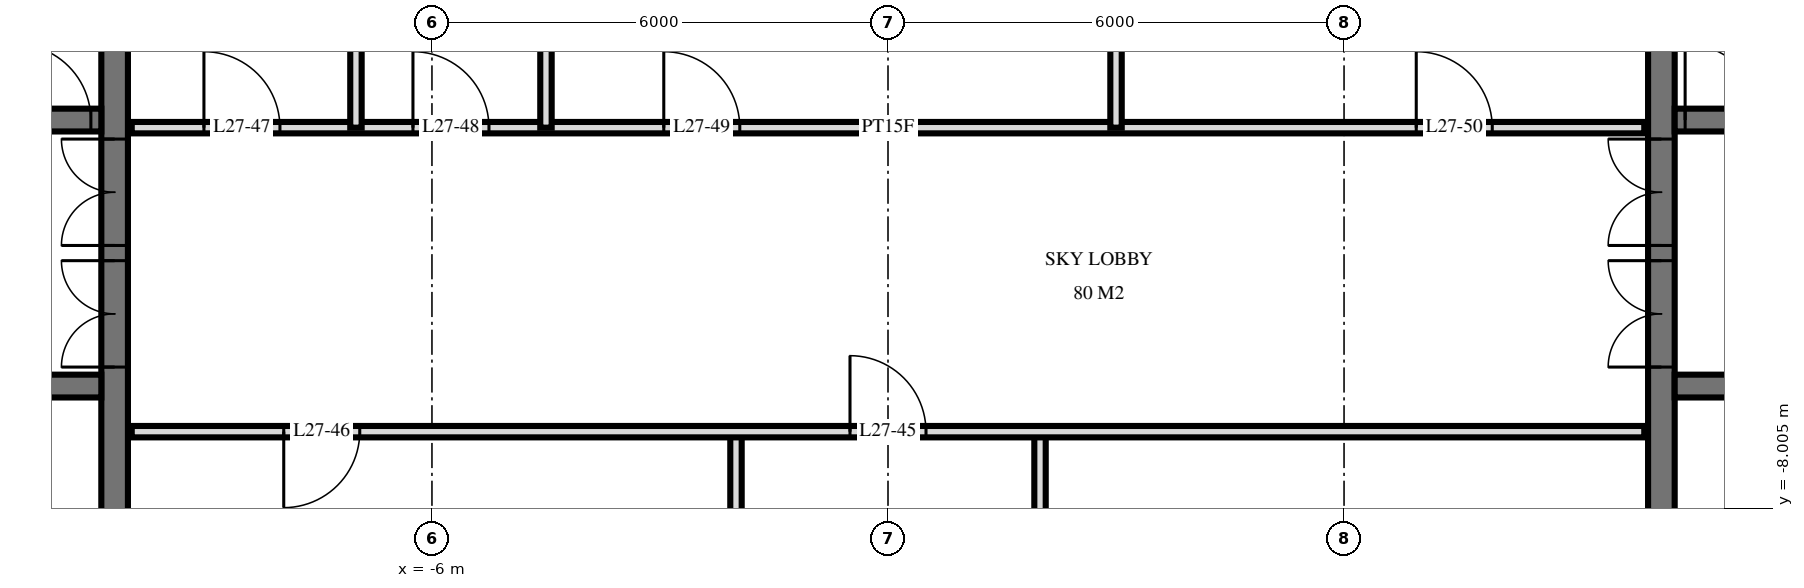
"""IFC4 building model, lengths in metres.
Left out: names, types, materials, properties, quantities, classifications, styles, units other than length and angle.
Written with IfcOpenShell. Run it as: python <this file> out.ifc"""

import sys

from ifc_helpers import new_model, si_unit, direction, frame, frame_2d, origin, place, context, subcontext, project, spatial, rectangle, extrude, element, fill, save


model = new_model("IFC4")
c1 = context("Model", 3, precision=1e-05, world=origin(), true_north=direction((0.0, 1.0)))
c2 = subcontext(c1, "Body", "Model", "MODEL_VIEW")
j1 = project(units=[si_unit("LENGTHUNIT", "METRE"), si_unit("PLANEANGLEUNIT", "RADIAN")], contexts=[c1])
p1 = place(None, origin())
s1 = spatial("IfcSite", under=j1, at=p1, CompositionType="ELEMENT")
p2 = place(p1, origin())
s2 = spatial("IfcBuilding", under=s1, at=p2, CompositionType="ELEMENT")
p3 = place(p2, frame((0.0, 0.0, 106.8)))
s3 = spatial("IfcBuildingStorey", under=s2, at=p3, CompositionType="ELEMENT", Elevation=106.8)
p4 = place(p3, frame((-10.175, -14.55, 0.0), z_axis=(0.0, 0.0, 1.0), x_axis=(0.0, 1.0, 0.0)))
e1 = element("IfcWall", 1, at=p4, inside=s3, PredefinedType="SHEAR", context=c2, shape_type="SweptSolid", body=[
    extrude(rectangle(XDim=14.1, YDim=0.35, at=frame_2d((7.05, 0.0))), origin(), (0.0, 0.0, 1.0), 6.0),
])
p5 = place(p4, frame((8.4, 0.0, 0.0)))
e2 = element("IfcOpeningElement", 2, at=p5, cuts=e1, PredefinedType="OPENING", context=c2, shape_type="SweptSolid", body=[
    extrude(rectangle(XDim=1.4, YDim=2.4, at=frame_2d((0.7, 1.2))), frame((0.0, 0.185, 0.0), z_axis=(0.0, -1.0, 0.0), x_axis=(1.0, 0.0, 0.0)), (0.0, 0.0, 1.0), 0.37),
])
p6 = place(p4, frame((10.0, 0.0, 0.0)))
e3 = element("IfcOpeningElement", 3, at=p6, cuts=e1, PredefinedType="OPENING", context=c2, shape_type="SweptSolid", body=[
    extrude(rectangle(XDim=1.4, YDim=2.4, at=frame_2d((0.7, 1.2))), frame((0.0, 0.185, 0.0), z_axis=(0.0, -1.0, 0.0), x_axis=(1.0, 0.0, 0.0)), (0.0, 0.0, 1.0), 0.37),
])
p7 = place(p4, frame((4.0, 0.0, 0.0)))
e4 = element("IfcOpeningElement", 4, at=p7, cuts=e1, PredefinedType="OPENING", context=c2, shape_type="SweptSolid", body=[
    extrude(rectangle(XDim=1.2, YDim=2.1, at=frame_2d((0.6, 1.05))), frame((0.0, 0.185, 0.0), z_axis=(0.0, -1.0, 0.0), x_axis=(1.0, 0.0, 0.0)), (0.0, 0.0, 1.0), 0.37),
])
p8 = place(p3, frame((-24.05, -2.9, 0.0), z_axis=(0.0, 0.0, 1.0), x_axis=(1.0, 0.0, 0.0)))
e5 = element("IfcWall", 5, at=p8, inside=s3, PredefinedType="SHEAR", context=c2, shape_type="SweptSolid", body=[
    extrude(rectangle(XDim=13.7, YDim=0.3, at=frame_2d((6.85, 0.0))), origin(), (0.0, 0.0, 1.0), 6.0),
])
p9 = place(p8, frame((2.95, 0.0, 0.0)))
e6 = element("IfcOpeningElement", 6, at=p9, cuts=e5, PredefinedType="OPENING", context=c2, shape_type="SweptSolid", body=[
    extrude(rectangle(XDim=1.1, YDim=2.1, at=frame_2d((0.55, 1.05))), frame((0.0, 0.16, 0.0), z_axis=(0.0, -1.0, 0.0), x_axis=(1.0, 0.0, 0.0)), (0.0, 0.0, 1.0), 0.32),
])
p10 = place(p8, frame((0.55, 0.0, 0.0)))
e7 = element("IfcOpeningElement", 7, at=p10, cuts=e5, PredefinedType="OPENING", context=c2, shape_type="SweptSolid", body=[
    extrude(rectangle(XDim=1.1, YDim=2.1, at=frame_2d((0.55, 1.05))), frame((0.0, 0.16, 0.0), z_axis=(0.0, -1.0, 0.0), x_axis=(1.0, 0.0, 0.0)), (0.0, 0.0, 1.0), 0.32),
])
p11 = place(p8, frame((6.613, 0.0, 0.0)))
e8 = element("IfcOpeningElement", 8, at=p11, cuts=e5, PredefinedType="OPENING", context=c2, shape_type="SweptSolid", body=[
    extrude(rectangle(XDim=0.9, YDim=2.1, at=frame_2d((0.45, 1.05))), frame((0.0, 0.16, 0.0), z_axis=(0.0, -1.0, 0.0), x_axis=(1.0, 0.0, 0.0)), (0.0, 0.0, 1.0), 0.32),
])
p12 = place(p8, frame((5.188, 0.0, 0.0)))
e9 = element("IfcOpeningElement", 9, at=p12, cuts=e5, PredefinedType="OPENING", context=c2, shape_type="SweptSolid", body=[
    extrude(rectangle(XDim=0.9, YDim=2.1, at=frame_2d((0.45, 1.05))), frame((0.0, 0.16, 0.0), z_axis=(0.0, -1.0, 0.0), x_axis=(1.0, 0.0, 0.0)), (0.0, 0.0, 1.0), 0.32),
])
p13 = place(p8, frame((12.562, 0.0, 0.0)))
e10 = element("IfcOpeningElement", 10, at=p13, cuts=e5, PredefinedType="OPENING", context=c2, shape_type="SweptSolid", body=[
    extrude(rectangle(XDim=1.0, YDim=2.1, at=frame_2d((0.5, 1.05))), frame((0.0, 0.16, 0.0), z_axis=(0.0, -1.0, 0.0), x_axis=(1.0, 0.0, 0.0)), (0.0, 0.0, 1.0), 0.32),
])
p14 = place(p8, frame((11.137, 0.0, 0.0)))
e11 = element("IfcOpeningElement", 11, at=p14, cuts=e5, PredefinedType="OPENING", context=c2, shape_type="SweptSolid", body=[
    extrude(rectangle(XDim=1.0, YDim=2.1, at=frame_2d((0.5, 1.05))), frame((0.0, 0.16, 0.0), z_axis=(0.0, -1.0, 0.0), x_axis=(1.0, 0.0, 0.0)), (0.0, 0.0, 1.0), 0.32),
])
p15 = place(p8, frame((8.85, 0.0, 0.0)))
e12 = element("IfcOpeningElement", 12, at=p15, cuts=e5, PredefinedType="OPENING", context=c2, shape_type="SweptSolid", body=[
    extrude(rectangle(XDim=1.0, YDim=2.1, at=frame_2d((0.5, 1.05))), frame((0.0, 0.16, 0.0), z_axis=(0.0, -1.0, 0.0), x_axis=(1.0, 0.0, 0.0)), (0.0, 0.0, 1.0), 0.32),
])
p16 = place(p3, frame((-24.05, -6.4, 0.0), z_axis=(0.0, 0.0, 1.0), x_axis=(1.0, 0.0, 0.0)))
e13 = element("IfcWall", 13, at=p16, inside=s3, PredefinedType="SHEAR", context=c2, shape_type="SweptSolid", body=[
    extrude(rectangle(XDim=13.7, YDim=0.3, at=frame_2d((6.85, 0.0))), origin(), (0.0, 0.0, 1.0), 6.0),
])
p17 = place(p16, frame((2.95, 0.0, 0.0)))
e14 = element("IfcOpeningElement", 14, at=p17, cuts=e13, PredefinedType="OPENING", context=c2, shape_type="SweptSolid", body=[
    extrude(rectangle(XDim=1.1, YDim=2.1, at=frame_2d((0.55, 1.05))), frame((0.0, 0.16, 0.0), z_axis=(0.0, -1.0, 0.0), x_axis=(1.0, 0.0, 0.0)), (0.0, 0.0, 1.0), 0.32),
])
p18 = place(p16, frame((0.55, 0.0, 0.0)))
e15 = element("IfcOpeningElement", 15, at=p18, cuts=e13, PredefinedType="OPENING", context=c2, shape_type="SweptSolid", body=[
    extrude(rectangle(XDim=1.1, YDim=2.1, at=frame_2d((0.55, 1.05))), frame((0.0, 0.16, 0.0), z_axis=(0.0, -1.0, 0.0), x_axis=(1.0, 0.0, 0.0)), (0.0, 0.0, 1.0), 0.32),
])
p19 = place(p16, frame((5.8, 0.0, 0.0)))
e16 = element("IfcOpeningElement", 16, at=p19, cuts=e13, PredefinedType="OPENING", context=c2, shape_type="SweptSolid", body=[
    extrude(rectangle(XDim=1.1, YDim=2.1, at=frame_2d((0.55, 1.05))), frame((0.0, 0.16, 0.0), z_axis=(0.0, -1.0, 0.0), x_axis=(1.0, 0.0, 0.0)), (0.0, 0.0, 1.0), 0.32),
])
p20 = place(p3, frame((10.175, -14.55, 0.0), z_axis=(0.0, 0.0, 1.0), x_axis=(0.0, 1.0, 0.0)))
e17 = element("IfcWall", 17, at=p20, inside=s3, PredefinedType="SHEAR", context=c2, shape_type="SweptSolid", body=[
    extrude(rectangle(XDim=14.1, YDim=0.35, at=frame_2d((7.05, 0.0))), origin(), (0.0, 0.0, 1.0), 6.0),
])
p21 = place(p20, frame((8.4, 0.0, 0.0)))
e18 = element("IfcOpeningElement", 18, at=p21, cuts=e17, PredefinedType="OPENING", context=c2, shape_type="SweptSolid", body=[
    extrude(rectangle(XDim=1.4, YDim=2.4, at=frame_2d((0.7, 1.2))), frame((0.0, 0.185, 0.0), z_axis=(0.0, -1.0, 0.0), x_axis=(1.0, 0.0, 0.0)), (0.0, 0.0, 1.0), 0.37),
])
p22 = place(p20, frame((10.0, 0.0, 0.0)))
e19 = element("IfcOpeningElement", 19, at=p22, cuts=e17, PredefinedType="OPENING", context=c2, shape_type="SweptSolid", body=[
    extrude(rectangle(XDim=1.4, YDim=2.4, at=frame_2d((0.7, 1.2))), frame((0.0, 0.185, 0.0), z_axis=(0.0, -1.0, 0.0), x_axis=(1.0, 0.0, 0.0)), (0.0, 0.0, 1.0), 0.37),
])
p23 = place(p20, frame((4.0, 0.0, 0.0)))
e20 = element("IfcOpeningElement", 20, at=p23, cuts=e17, PredefinedType="OPENING", context=c2, shape_type="SweptSolid", body=[
    extrude(rectangle(XDim=1.2, YDim=2.1, at=frame_2d((0.6, 1.05))), frame((0.0, 0.185, 0.0), z_axis=(0.0, -1.0, 0.0), x_axis=(1.0, 0.0, 0.0)), (0.0, 0.0, 1.0), 0.37),
])
p24 = place(p3, frame((10.35, -2.9, 0.0), z_axis=(0.0, 0.0, 1.0), x_axis=(1.0, 0.0, 0.0)))
e21 = element("IfcWall", 21, at=p24, inside=s3, PredefinedType="SHEAR", context=c2, shape_type="SweptSolid", body=[
    extrude(rectangle(XDim=13.7, YDim=0.3, at=frame_2d((6.85, 0.0))), origin(), (0.0, 0.0, 1.0), 6.0),
])
p25 = place(p24, frame((9.65, 0.0, 0.0)))
e22 = element("IfcOpeningElement", 22, at=p25, cuts=e21, PredefinedType="OPENING", context=c2, shape_type="SweptSolid", body=[
    extrude(rectangle(XDim=1.1, YDim=2.1, at=frame_2d((0.55, 1.05))), frame((0.0, 0.16, 0.0), z_axis=(0.0, -1.0, 0.0), x_axis=(1.0, 0.0, 0.0)), (0.0, 0.0, 1.0), 0.32),
])
p26 = place(p24, frame((12.05, 0.0, 0.0)))
e23 = element("IfcOpeningElement", 23, at=p26, cuts=e21, PredefinedType="OPENING", context=c2, shape_type="SweptSolid", body=[
    extrude(rectangle(XDim=1.1, YDim=2.1, at=frame_2d((0.55, 1.05))), frame((0.0, 0.16, 0.0), z_axis=(0.0, -1.0, 0.0), x_axis=(1.0, 0.0, 0.0)), (0.0, 0.0, 1.0), 0.32),
])
p27 = place(p24, frame((6.188, 0.0, 0.0)))
e24 = element("IfcOpeningElement", 24, at=p27, cuts=e21, PredefinedType="OPENING", context=c2, shape_type="SweptSolid", body=[
    extrude(rectangle(XDim=0.9, YDim=2.1, at=frame_2d((0.45, 1.05))), frame((0.0, 0.16, 0.0), z_axis=(0.0, -1.0, 0.0), x_axis=(1.0, 0.0, 0.0)), (0.0, 0.0, 1.0), 0.32),
])
p28 = place(p24, frame((7.613, 0.0, 0.0)))
e25 = element("IfcOpeningElement", 25, at=p28, cuts=e21, PredefinedType="OPENING", context=c2, shape_type="SweptSolid", body=[
    extrude(rectangle(XDim=0.9, YDim=2.1, at=frame_2d((0.45, 1.05))), frame((0.0, 0.16, 0.0), z_axis=(0.0, -1.0, 0.0), x_axis=(1.0, 0.0, 0.0)), (0.0, 0.0, 1.0), 0.32),
])
p29 = place(p24, frame((0.137, 0.0, 0.0)))
e26 = element("IfcOpeningElement", 26, at=p29, cuts=e21, PredefinedType="OPENING", context=c2, shape_type="SweptSolid", body=[
    extrude(rectangle(XDim=1.0, YDim=2.1, at=frame_2d((0.5, 1.05))), frame((0.0, 0.16, 0.0), z_axis=(0.0, -1.0, 0.0), x_axis=(1.0, 0.0, 0.0)), (0.0, 0.0, 1.0), 0.32),
])
p30 = place(p24, frame((1.562, 0.0, 0.0)))
e27 = element("IfcOpeningElement", 27, at=p30, cuts=e21, PredefinedType="OPENING", context=c2, shape_type="SweptSolid", body=[
    extrude(rectangle(XDim=1.0, YDim=2.1, at=frame_2d((0.5, 1.05))), frame((0.0, 0.16, 0.0), z_axis=(0.0, -1.0, 0.0), x_axis=(1.0, 0.0, 0.0)), (0.0, 0.0, 1.0), 0.32),
])
p31 = place(p24, frame((3.85, 0.0, 0.0)))
e28 = element("IfcOpeningElement", 28, at=p31, cuts=e21, PredefinedType="OPENING", context=c2, shape_type="SweptSolid", body=[
    extrude(rectangle(XDim=1.0, YDim=2.1, at=frame_2d((0.5, 1.05))), frame((0.0, 0.16, 0.0), z_axis=(0.0, -1.0, 0.0), x_axis=(1.0, 0.0, 0.0)), (0.0, 0.0, 1.0), 0.32),
])
p32 = place(p3, frame((10.35, -6.4, 0.0), z_axis=(0.0, 0.0, 1.0), x_axis=(1.0, 0.0, 0.0)))
e29 = element("IfcWall", 29, at=p32, inside=s3, PredefinedType="SHEAR", context=c2, shape_type="SweptSolid", body=[
    extrude(rectangle(XDim=13.7, YDim=0.3, at=frame_2d((6.85, 0.0))), origin(), (0.0, 0.0, 1.0), 6.0),
])
p33 = place(p32, frame((9.65, 0.0, 0.0)))
e30 = element("IfcOpeningElement", 30, at=p33, cuts=e29, PredefinedType="OPENING", context=c2, shape_type="SweptSolid", body=[
    extrude(rectangle(XDim=1.1, YDim=2.1, at=frame_2d((0.55, 1.05))), frame((0.0, 0.16, 0.0), z_axis=(0.0, -1.0, 0.0), x_axis=(1.0, 0.0, 0.0)), (0.0, 0.0, 1.0), 0.32),
])
p34 = place(p32, frame((12.05, 0.0, 0.0)))
e31 = element("IfcOpeningElement", 31, at=p34, cuts=e29, PredefinedType="OPENING", context=c2, shape_type="SweptSolid", body=[
    extrude(rectangle(XDim=1.1, YDim=2.1, at=frame_2d((0.55, 1.05))), frame((0.0, 0.16, 0.0), z_axis=(0.0, -1.0, 0.0), x_axis=(1.0, 0.0, 0.0)), (0.0, 0.0, 1.0), 0.32),
])
p35 = place(p32, frame((6.8, 0.0, 0.0)))
e32 = element("IfcOpeningElement", 32, at=p35, cuts=e29, PredefinedType="OPENING", context=c2, shape_type="SweptSolid", body=[
    extrude(rectangle(XDim=1.1, YDim=2.1, at=frame_2d((0.55, 1.05))), frame((0.0, 0.16, 0.0), z_axis=(0.0, -1.0, 0.0), x_axis=(1.0, 0.0, 0.0)), (0.0, 0.0, 1.0), 0.32),
])
p36 = place(p3, frame((3.0, -3.0, 0.0), z_axis=(0.0, 0.0, 1.0), x_axis=(0.0, 1.0, 0.0)))
e33 = element("IfcWall", 33, at=p36, inside=s3, PredefinedType="PARTITIONING", context=c2, shape_type="SweptSolid", body=[
    extrude(rectangle(XDim=3.96, YDim=0.15, at=frame_2d((1.98, 0.0))), origin(), (0.0, 0.0, 1.0), 5.7),
])
for number, where, z_axis, x_axis in (
    (34, (2.0, -11.0, 0.0), (0.0, 0.0, 1.0), (0.0, 1.0, 0.0)),
    (35, (-2.0, -11.0, 0.0), (0.0, 0.0, 1.0), (0.0, 1.0, 0.0)),
):
    element("IfcWall", number, at=place(p3, frame(where, z_axis=z_axis, x_axis=x_axis)), inside=s3, PredefinedType="PARTITIONING", context=c2, shape_type="SweptSolid", body=[
        extrude(rectangle(XDim=4.0, YDim=0.15, at=frame_2d((2.0, 0.0))), origin(), (0.0, 0.0, 1.0), 5.7),
    ])
p37 = place(p3, frame((-4.5, -3.0, 0.0), z_axis=(0.0, 0.0, 1.0), x_axis=(0.0, 1.0, 0.0)))
e36 = element("IfcWall", 36, at=p37, inside=s3, PredefinedType="PLUMBINGWALL", context=c2, shape_type="SweptSolid", body=[
    extrude(rectangle(XDim=4.02, YDim=0.15, at=frame_2d((2.01, 0.0))), origin(), (0.0, 0.0, 1.0), 5.7),
])
p38 = place(p3, frame((-7.0, -3.0, 0.0), z_axis=(0.0, 0.0, 1.0), x_axis=(0.0, 1.0, 0.0)))
e37 = element("IfcWall", 37, at=p38, inside=s3, PredefinedType="PLUMBINGWALL", context=c2, shape_type="SweptSolid", body=[
    extrude(rectangle(XDim=3.96, YDim=0.15, at=frame_2d((1.98, 0.0))), origin(), (0.0, 0.0, 1.0), 5.7),
])
p39 = place(p3, frame((-9.95, -7.0, 0.0), z_axis=(0.0, 0.0, 1.0), x_axis=(1.0, 0.0, 0.0)))
e38 = element("IfcWall", 38, at=p39, inside=s3, PredefinedType="PARTITIONING", context=c2, shape_type="SweptSolid", body=[
    extrude(rectangle(XDim=19.9, YDim=0.15, at=frame_2d((9.95, 0.0))), origin(), (0.0, 0.0, 1.0), 5.7),
])
p40 = place(p39, frame((9.45, 0.0, 0.0)))
e39 = element("IfcOpeningElement", 39, at=p40, cuts=e38, PredefinedType="OPENING", context=c2, shape_type="SweptSolid", body=[
    extrude(rectangle(XDim=1.0, YDim=2.1, at=frame_2d((0.5, 1.05))), frame((0.0, 0.085, 0.0), z_axis=(0.0, -1.0, 0.0), x_axis=(1.0, 0.0, 0.0)), (0.0, 0.0, 1.0), 0.17),
])
p41 = place(p39, frame((2.0, 0.0, 0.0)))
e40 = element("IfcOpeningElement", 40, at=p41, cuts=e38, PredefinedType="OPENING", context=c2, shape_type="SweptSolid", body=[
    extrude(rectangle(XDim=1.0, YDim=2.1, at=frame_2d((0.5, 1.05))), frame((0.0, 0.085, 0.0), z_axis=(0.0, -1.0, 0.0), x_axis=(1.0, 0.0, 0.0)), (0.0, 0.0, 1.0), 0.17),
])
p42 = place(p3, frame((-9.95, -3.0, 0.0), z_axis=(0.0, 0.0, 1.0), x_axis=(1.0, 0.0, 0.0)))
e41 = element("IfcWall", 41, at=p42, inside=s3, PredefinedType="PARTITIONING", context=c2, shape_type="SweptSolid", body=[
    extrude(rectangle(XDim=19.9, YDim=0.15, at=frame_2d((9.95, 0.0))), origin(), (0.0, 0.0, 1.0), 5.7),
])
p43 = place(p42, frame((0.95, 0.0, 0.0)))
e42 = element("IfcOpeningElement", 42, at=p43, cuts=e41, PredefinedType="OPENING", context=c2, shape_type="SweptSolid", body=[
    extrude(rectangle(XDim=1.0, YDim=2.1, at=frame_2d((0.5, 1.05))), frame((0.0, 0.085, 0.0), z_axis=(0.0, -1.0, 0.0), x_axis=(1.0, 0.0, 0.0)), (0.0, 0.0, 1.0), 0.17),
])
p44 = place(p42, frame((3.7, 0.0, 0.0)))
e43 = element("IfcOpeningElement", 43, at=p44, cuts=e41, PredefinedType="OPENING", context=c2, shape_type="SweptSolid", body=[
    extrude(rectangle(XDim=1.0, YDim=2.1, at=frame_2d((0.5, 1.05))), frame((0.0, 0.085, 0.0), z_axis=(0.0, -1.0, 0.0), x_axis=(1.0, 0.0, 0.0)), (0.0, 0.0, 1.0), 0.17),
])
p45 = place(p42, frame((7.0, 0.0, 0.0)))
e44 = element("IfcOpeningElement", 44, at=p45, cuts=e41, PredefinedType="OPENING", context=c2, shape_type="SweptSolid", body=[
    extrude(rectangle(XDim=1.0, YDim=2.1, at=frame_2d((0.5, 1.05))), frame((0.0, 0.085, 0.0), z_axis=(0.0, -1.0, 0.0), x_axis=(1.0, 0.0, 0.0)), (0.0, 0.0, 1.0), 0.17),
])
p46 = place(p42, frame((16.9, 0.0, 0.0)))
e45 = element("IfcOpeningElement", 45, at=p46, cuts=e41, PredefinedType="OPENING", context=c2, shape_type="SweptSolid", body=[
    extrude(rectangle(XDim=1.0, YDim=2.1, at=frame_2d((0.5, 1.05))), frame((0.0, 0.085, 0.0), z_axis=(0.0, -1.0, 0.0), x_axis=(1.0, 0.0, 0.0)), (0.0, 0.0, 1.0), 0.17),
])
p47 = place(p5, origin())
e46 = element("IfcDoor", 46, at=p47, inside=s3, OperationType="DOUBLE_DOOR_SINGLE_SWING", PredefinedType="DOOR", context=c2, shape_type="SweptSolid", body=[
    extrude(rectangle(XDim=1.4, YDim=2.4, at=frame_2d((0.7, 1.2))), frame((0.0, 0.025, 0.0), z_axis=(0.0, -1.0, 0.0), x_axis=(1.0, 0.0, 0.0)), (0.0, 0.0, 1.0), 0.05),
])
fill(e2, e46)
p48 = place(p6, origin())
e47 = element("IfcDoor", 47, at=p48, inside=s3, OperationType="DOUBLE_DOOR_SINGLE_SWING", PredefinedType="DOOR", context=c2, shape_type="SweptSolid", body=[
    extrude(rectangle(XDim=1.4, YDim=2.4, at=frame_2d((0.7, 1.2))), frame((0.0, 0.025, 0.0), z_axis=(0.0, -1.0, 0.0), x_axis=(1.0, 0.0, 0.0)), (0.0, 0.0, 1.0), 0.05),
])
fill(e3, e47)
p49 = place(p13, origin())
e48 = element("IfcDoor", 48, at=p49, inside=s3, OperationType="SINGLE_SWING_RIGHT", PredefinedType="DOOR", context=c2, shape_type="SweptSolid", body=[
    extrude(rectangle(XDim=1.0, YDim=2.1, at=frame_2d((0.5, 1.05))), frame((0.0, 0.025, 0.0), z_axis=(0.0, -1.0, 0.0), x_axis=(1.0, 0.0, 0.0)), (0.0, 0.0, 1.0), 0.05),
])
fill(e10, e48)
p50 = place(p21, origin())
e49 = element("IfcDoor", 49, at=p50, inside=s3, OperationType="DOUBLE_DOOR_SINGLE_SWING", PredefinedType="DOOR", context=c2, shape_type="SweptSolid", body=[
    extrude(rectangle(XDim=1.4, YDim=2.4, at=frame_2d((0.7, 1.2))), frame((0.0, 0.025, 0.0), z_axis=(0.0, -1.0, 0.0), x_axis=(1.0, 0.0, 0.0)), (0.0, 0.0, 1.0), 0.05),
])
fill(e18, e49)
p51 = place(p22, origin())
e50 = element("IfcDoor", 50, at=p51, inside=s3, OperationType="DOUBLE_DOOR_SINGLE_SWING", PredefinedType="DOOR", context=c2, shape_type="SweptSolid", body=[
    extrude(rectangle(XDim=1.4, YDim=2.4, at=frame_2d((0.7, 1.2))), frame((0.0, 0.025, 0.0), z_axis=(0.0, -1.0, 0.0), x_axis=(1.0, 0.0, 0.0)), (0.0, 0.0, 1.0), 0.05),
])
fill(e19, e50)
p52 = place(p29, origin())
e51 = element("IfcDoor", 51, at=p52, inside=s3, OperationType="SINGLE_SWING_RIGHT", PredefinedType="DOOR", context=c2, shape_type="SweptSolid", body=[
    extrude(rectangle(XDim=1.0, YDim=2.1, at=frame_2d((0.5, 1.05))), frame((0.0, 0.025, 0.0), z_axis=(0.0, -1.0, 0.0), x_axis=(1.0, 0.0, 0.0)), (0.0, 0.0, 1.0), 0.05),
])
fill(e26, e51)
p53 = place(p40, origin())
e52 = element("IfcDoor", 52, at=p53, inside=s3, OperationType="SINGLE_SWING_RIGHT", PredefinedType="DOOR", context=c2, shape_type="SweptSolid", body=[
    extrude(rectangle(XDim=1.0, YDim=2.1, at=frame_2d((0.5, 1.05))), frame((0.0, 0.025, 0.0), z_axis=(0.0, -1.0, 0.0), x_axis=(1.0, 0.0, 0.0)), (0.0, 0.0, 1.0), 0.05),
])
fill(e39, e52)
p54 = place(p41, frame((0.5, 0.0, 0.0), z_axis=(0.0, 0.0, 1.0), x_axis=(-1.0, 0.0, 0.0)))
e53 = element("IfcDoor", 53, at=p54, inside=s3, OperationType="SINGLE_SWING_LEFT", PredefinedType="DOOR", context=c2, shape_type="SweptSolid", body=[
    extrude(rectangle(XDim=1.0, YDim=2.1, at=frame_2d((0.0, 1.05))), frame((0.0, -0.025, 0.0), z_axis=(0.0, 1.0, 0.0), x_axis=(-1.0, 0.0, 0.0)), (0.0, 0.0, 1.0), 0.05),
])
fill(e40, e53)
p55 = place(p43, origin())
e54 = element("IfcDoor", 54, at=p55, inside=s3, OperationType="SINGLE_SWING_RIGHT", PredefinedType="DOOR", context=c2, shape_type="SweptSolid", body=[
    extrude(rectangle(XDim=1.0, YDim=2.1, at=frame_2d((0.5, 1.05))), frame((0.0, 0.025, 0.0), z_axis=(0.0, -1.0, 0.0), x_axis=(1.0, 0.0, 0.0)), (0.0, 0.0, 1.0), 0.05),
])
fill(e42, e54)
p56 = place(p44, origin())
e55 = element("IfcDoor", 55, at=p56, inside=s3, OperationType="SINGLE_SWING_RIGHT", PredefinedType="DOOR", context=c2, shape_type="SweptSolid", body=[
    extrude(rectangle(XDim=1.0, YDim=2.1, at=frame_2d((0.5, 1.05))), frame((0.0, 0.025, 0.0), z_axis=(0.0, -1.0, 0.0), x_axis=(1.0, 0.0, 0.0)), (0.0, 0.0, 1.0), 0.05),
])
fill(e43, e55)
p57 = place(p45, origin())
e56 = element("IfcDoor", 56, at=p57, inside=s3, OperationType="SINGLE_SWING_RIGHT", PredefinedType="DOOR", context=c2, shape_type="SweptSolid", body=[
    extrude(rectangle(XDim=1.0, YDim=2.1, at=frame_2d((0.5, 1.05))), frame((0.0, 0.025, 0.0), z_axis=(0.0, -1.0, 0.0), x_axis=(1.0, 0.0, 0.0)), (0.0, 0.0, 1.0), 0.05),
])
fill(e44, e56)
p58 = place(p46, origin())
e57 = element("IfcDoor", 57, at=p58, inside=s3, OperationType="SINGLE_SWING_RIGHT", PredefinedType="DOOR", context=c2, shape_type="SweptSolid", body=[
    extrude(rectangle(XDim=1.0, YDim=2.1, at=frame_2d((0.5, 1.05))), frame((0.0, 0.025, 0.0), z_axis=(0.0, -1.0, 0.0), x_axis=(1.0, 0.0, 0.0)), (0.0, 0.0, 1.0), 0.05),
])
fill(e45, e57)
save(model, sys.argv[1])
